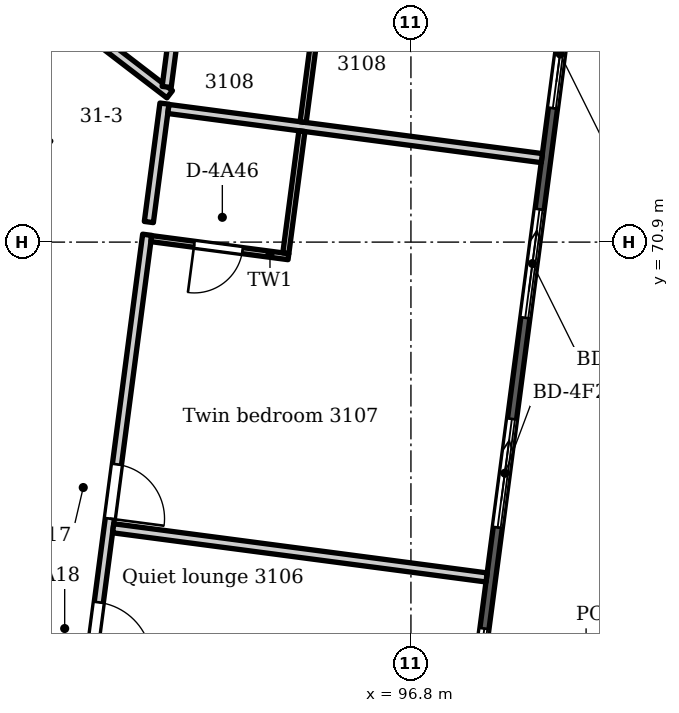
"""IFC4 building model, lengths in metres.
Left out: names, types, materials, properties, quantities, classifications, styles, units other than length and angle.
Written with IfcOpenShell. Run it as: python <this file> out.ifc"""

import sys

from ifc_helpers import new_model, si_unit, direction, frame, frame_2d, origin, place, context, subcontext, project, spatial, polyline, rectangle, outline, extrude, element, fill, save


model = new_model("IFC4")
c1 = context("Model", 3, precision=1e-05, world=origin(), true_north=direction((0.0, 1.0)))
c2 = subcontext(c1, "Body", "Model", "MODEL_VIEW")
j1 = project(units=[si_unit("LENGTHUNIT", "METRE"), si_unit("PLANEANGLEUNIT", "RADIAN")], contexts=[c1])
p1 = place(None, origin())
s1 = spatial("IfcSite", under=j1, at=p1, CompositionType="ELEMENT")
p2 = place(p1, origin())
s2 = spatial("IfcBuilding", under=s1, at=p2, CompositionType="ELEMENT")
p3 = place(p2, frame((0.0, 0.0, 124.2)))
s3 = spatial("IfcBuildingStorey", under=s2, at=p3, CompositionType="ELEMENT", Elevation=124.2)
p4 = place(p3, frame((52.387, 70.1, 0.0), z_axis=(0.0, 0.0, 1.0), x_axis=(0.92388051416, 0.382681062447, 0.0)))
e1 = element("IfcWall", 1, at=p4, inside=s3, PredefinedType="SOLIDWALL", context=c2, shape_type="SweptSolid", body=[
    extrude(outline(polyline([(0.149, 0.075), (0.149, -0.075), (45.057, -0.075), (45.057, 0.075), (0.149, 0.075)])), origin(), (0.0, 0.0, 1.0), 3.3),
])
p5 = place(p4, frame((1.239, 0.0, 0.0)))
e2 = element("IfcOpeningElement", 2, at=p5, cuts=e1, PredefinedType="OPENING", context=c2, shape_type="SweptSolid", body=[
    extrude(rectangle(XDim=1.8, YDim=2.6, at=frame_2d((0.9, 1.3))), frame((0.0, 0.085, 0.0), z_axis=(0.0, -1.0, 0.0), x_axis=(1.0, 0.0, 0.0)), (0.0, 0.0, 1.0), 0.17),
])
p6 = place(p4, frame((4.316, 0.0, 0.0)))
e3 = element("IfcOpeningElement", 3, at=p6, cuts=e1, PredefinedType="OPENING", context=c2, shape_type="SweptSolid", body=[
    extrude(rectangle(XDim=1.8, YDim=2.6, at=frame_2d((0.9, 1.3))), frame((0.0, 0.085, 0.0), z_axis=(0.0, -1.0, 0.0), x_axis=(1.0, 0.0, 0.0)), (0.0, 0.0, 1.0), 0.17),
])
p7 = place(p4, frame((7.793, 0.0, 0.0)))
e4 = element("IfcOpeningElement", 4, at=p7, cuts=e1, PredefinedType="OPENING", context=c2, shape_type="SweptSolid", body=[
    extrude(rectangle(XDim=1.8, YDim=2.6, at=frame_2d((0.9, 1.3))), frame((0.0, 0.085, 0.0), z_axis=(0.0, -1.0, 0.0), x_axis=(1.0, 0.0, 0.0)), (0.0, 0.0, 1.0), 0.17),
])
p8 = place(p4, frame((11.271, 0.0, 0.0)))
e5 = element("IfcOpeningElement", 5, at=p8, cuts=e1, PredefinedType="OPENING", context=c2, shape_type="SweptSolid", body=[
    extrude(rectangle(XDim=1.8, YDim=2.6, at=frame_2d((0.9, 1.3))), frame((0.0, 0.085, 0.0), z_axis=(0.0, -1.0, 0.0), x_axis=(1.0, 0.0, 0.0)), (0.0, 0.0, 1.0), 0.17),
])
p9 = place(p4, frame((14.748, 0.0, 0.0)))
e6 = element("IfcOpeningElement", 6, at=p9, cuts=e1, PredefinedType="OPENING", context=c2, shape_type="SweptSolid", body=[
    extrude(rectangle(XDim=1.8, YDim=2.6, at=frame_2d((0.9, 1.3))), frame((0.0, 0.085, 0.0), z_axis=(0.0, -1.0, 0.0), x_axis=(1.0, 0.0, 0.0)), (0.0, 0.0, 1.0), 0.17),
])
p10 = place(p4, frame((18.226, 0.0, 0.0)))
e7 = element("IfcOpeningElement", 7, at=p10, cuts=e1, PredefinedType="OPENING", context=c2, shape_type="SweptSolid", body=[
    extrude(rectangle(XDim=1.8, YDim=2.6, at=frame_2d((0.9, 1.3))), frame((0.0, 0.085, 0.0), z_axis=(0.0, -1.0, 0.0), x_axis=(1.0, 0.0, 0.0)), (0.0, 0.0, 1.0), 0.17),
])
p11 = place(p4, frame((21.703, 0.0, 0.0)))
e8 = element("IfcOpeningElement", 8, at=p11, cuts=e1, PredefinedType="OPENING", context=c2, shape_type="SweptSolid", body=[
    extrude(rectangle(XDim=1.8, YDim=2.6, at=frame_2d((0.9, 1.3))), frame((0.0, 0.085, 0.0), z_axis=(0.0, -1.0, 0.0), x_axis=(1.0, 0.0, 0.0)), (0.0, 0.0, 1.0), 0.17),
])
p12 = place(p4, frame((25.18, 0.0, 0.0)))
e9 = element("IfcOpeningElement", 9, at=p12, cuts=e1, PredefinedType="OPENING", context=c2, shape_type="SweptSolid", body=[
    extrude(rectangle(XDim=1.8, YDim=2.6, at=frame_2d((0.9, 1.3))), frame((0.0, 0.085, 0.0), z_axis=(0.0, -1.0, 0.0), x_axis=(1.0, 0.0, 0.0)), (0.0, 0.0, 1.0), 0.17),
])
p13 = place(p4, frame((28.658, 0.0, 0.0)))
e10 = element("IfcOpeningElement", 10, at=p13, cuts=e1, PredefinedType="OPENING", context=c2, shape_type="SweptSolid", body=[
    extrude(rectangle(XDim=1.8, YDim=2.6, at=frame_2d((0.9, 1.3))), frame((0.0, 0.085, 0.0), z_axis=(0.0, -1.0, 0.0), x_axis=(1.0, 0.0, 0.0)), (0.0, 0.0, 1.0), 0.17),
])
p14 = place(p4, frame((32.135, 0.0, 0.0)))
e11 = element("IfcOpeningElement", 11, at=p14, cuts=e1, PredefinedType="OPENING", context=c2, shape_type="SweptSolid", body=[
    extrude(rectangle(XDim=1.8, YDim=2.6, at=frame_2d((0.9, 1.3))), frame((0.0, 0.085, 0.0), z_axis=(0.0, -1.0, 0.0), x_axis=(1.0, 0.0, 0.0)), (0.0, 0.0, 1.0), 0.17),
])
p15 = place(p4, frame((35.613, 0.0, 0.0)))
e12 = element("IfcOpeningElement", 12, at=p15, cuts=e1, PredefinedType="OPENING", context=c2, shape_type="SweptSolid", body=[
    extrude(rectangle(XDim=1.8, YDim=2.6, at=frame_2d((0.9, 1.3))), frame((0.0, 0.085, 0.0), z_axis=(0.0, -1.0, 0.0), x_axis=(1.0, 0.0, 0.0)), (0.0, 0.0, 1.0), 0.17),
])
p16 = place(p4, frame((39.09, 0.0, 0.0)))
e13 = element("IfcOpeningElement", 13, at=p16, cuts=e1, PredefinedType="OPENING", context=c2, shape_type="SweptSolid", body=[
    extrude(rectangle(XDim=1.8, YDim=2.6, at=frame_2d((0.9, 1.3))), frame((0.0, 0.085, 0.0), z_axis=(0.0, -1.0, 0.0), x_axis=(1.0, 0.0, 0.0)), (0.0, 0.0, 1.0), 0.17),
])
p17 = place(p4, frame((42.167, 0.0, 0.0)))
e14 = element("IfcOpeningElement", 14, at=p17, cuts=e1, PredefinedType="OPENING", context=c2, shape_type="SweptSolid", body=[
    extrude(rectangle(XDim=1.8, YDim=2.6, at=frame_2d((0.9, 1.3))), frame((0.0, 0.085, 0.0), z_axis=(0.0, -1.0, 0.0), x_axis=(1.0, 0.0, 0.0)), (0.0, 0.0, 1.0), 0.17),
])
p18 = place(p3, frame((100.388, 82.614, 0.0), z_axis=(0.0, 0.0, 1.0), x_axis=(-0.130522128443, -0.991445396372, 0.0)))
e15 = element("IfcWall", 15, at=p18, inside=s3, PredefinedType="SOLIDWALL", context=c2, shape_type="SweptSolid", body=[
    extrude(outline(polyline([(0.149, 0.075), (0.149, -0.075), (45.057, -0.075), (45.057, 0.075), (0.149, 0.075)])), origin(), (0.0, 0.0, 1.0), 3.3),
])
p19 = place(p18, frame((1.239, 0.0, 0.0)))
e16 = element("IfcOpeningElement", 16, at=p19, cuts=e15, PredefinedType="OPENING", context=c2, shape_type="SweptSolid", body=[
    extrude(rectangle(XDim=1.8, YDim=2.6, at=frame_2d((0.9, 1.3))), frame((0.0, 0.085, 0.0), z_axis=(0.0, -1.0, 0.0), x_axis=(1.0, 0.0, 0.0)), (0.0, 0.0, 1.0), 0.17),
])
p20 = place(p18, frame((4.316, 0.0, 0.0)))
e17 = element("IfcOpeningElement", 17, at=p20, cuts=e15, PredefinedType="OPENING", context=c2, shape_type="SweptSolid", body=[
    extrude(rectangle(XDim=1.8, YDim=2.6, at=frame_2d((0.9, 1.3))), frame((0.0, 0.085, 0.0), z_axis=(0.0, -1.0, 0.0), x_axis=(1.0, 0.0, 0.0)), (0.0, 0.0, 1.0), 0.17),
])
p21 = place(p18, frame((7.793, 0.0, 0.0)))
e18 = element("IfcOpeningElement", 18, at=p21, cuts=e15, PredefinedType="OPENING", context=c2, shape_type="SweptSolid", body=[
    extrude(rectangle(XDim=1.8, YDim=2.6, at=frame_2d((0.9, 1.3))), frame((0.0, 0.085, 0.0), z_axis=(0.0, -1.0, 0.0), x_axis=(1.0, 0.0, 0.0)), (0.0, 0.0, 1.0), 0.17),
])
p22 = place(p18, frame((11.271, 0.0, 0.0)))
e19 = element("IfcOpeningElement", 19, at=p22, cuts=e15, PredefinedType="OPENING", context=c2, shape_type="SweptSolid", body=[
    extrude(rectangle(XDim=1.8, YDim=2.6, at=frame_2d((0.9, 1.3))), frame((0.0, 0.085, 0.0), z_axis=(0.0, -1.0, 0.0), x_axis=(1.0, 0.0, 0.0)), (0.0, 0.0, 1.0), 0.17),
])
p23 = place(p18, frame((14.748, 0.0, 0.0)))
e20 = element("IfcOpeningElement", 20, at=p23, cuts=e15, PredefinedType="OPENING", context=c2, shape_type="SweptSolid", body=[
    extrude(rectangle(XDim=1.8, YDim=2.6, at=frame_2d((0.9, 1.3))), frame((0.0, 0.085, 0.0), z_axis=(0.0, -1.0, 0.0), x_axis=(1.0, 0.0, 0.0)), (0.0, 0.0, 1.0), 0.17),
])
p24 = place(p18, frame((18.226, 0.0, 0.0)))
e21 = element("IfcOpeningElement", 21, at=p24, cuts=e15, PredefinedType="OPENING", context=c2, shape_type="SweptSolid", body=[
    extrude(rectangle(XDim=1.8, YDim=2.6, at=frame_2d((0.9, 1.3))), frame((0.0, 0.085, 0.0), z_axis=(0.0, -1.0, 0.0), x_axis=(1.0, 0.0, 0.0)), (0.0, 0.0, 1.0), 0.17),
])
p25 = place(p18, frame((21.703, 0.0, 0.0)))
e22 = element("IfcOpeningElement", 22, at=p25, cuts=e15, PredefinedType="OPENING", context=c2, shape_type="SweptSolid", body=[
    extrude(rectangle(XDim=1.8, YDim=2.6, at=frame_2d((0.9, 1.3))), frame((0.0, 0.085, 0.0), z_axis=(0.0, -1.0, 0.0), x_axis=(1.0, 0.0, 0.0)), (0.0, 0.0, 1.0), 0.17),
])
p26 = place(p18, frame((25.18, 0.0, 0.0)))
e23 = element("IfcOpeningElement", 23, at=p26, cuts=e15, PredefinedType="OPENING", context=c2, shape_type="SweptSolid", body=[
    extrude(rectangle(XDim=1.8, YDim=2.6, at=frame_2d((0.9, 1.3))), frame((0.0, 0.085, 0.0), z_axis=(0.0, -1.0, 0.0), x_axis=(1.0, 0.0, 0.0)), (0.0, 0.0, 1.0), 0.17),
])
p27 = place(p18, frame((28.658, 0.0, 0.0)))
e24 = element("IfcOpeningElement", 24, at=p27, cuts=e15, PredefinedType="OPENING", context=c2, shape_type="SweptSolid", body=[
    extrude(rectangle(XDim=1.8, YDim=2.6, at=frame_2d((0.9, 1.3))), frame((0.0, 0.085, 0.0), z_axis=(0.0, -1.0, 0.0), x_axis=(1.0, 0.0, 0.0)), (0.0, 0.0, 1.0), 0.17),
])
p28 = place(p18, frame((32.135, 0.0, 0.0)))
e25 = element("IfcOpeningElement", 25, at=p28, cuts=e15, PredefinedType="OPENING", context=c2, shape_type="SweptSolid", body=[
    extrude(rectangle(XDim=1.8, YDim=2.6, at=frame_2d((0.9, 1.3))), frame((0.0, 0.085, 0.0), z_axis=(0.0, -1.0, 0.0), x_axis=(1.0, 0.0, 0.0)), (0.0, 0.0, 1.0), 0.17),
])
p29 = place(p18, frame((35.613, 0.0, 0.0)))
e26 = element("IfcOpeningElement", 26, at=p29, cuts=e15, PredefinedType="OPENING", context=c2, shape_type="SweptSolid", body=[
    extrude(rectangle(XDim=1.8, YDim=2.6, at=frame_2d((0.9, 1.3))), frame((0.0, 0.085, 0.0), z_axis=(0.0, -1.0, 0.0), x_axis=(1.0, 0.0, 0.0)), (0.0, 0.0, 1.0), 0.17),
])
p30 = place(p18, frame((39.09, 0.0, 0.0)))
e27 = element("IfcOpeningElement", 27, at=p30, cuts=e15, PredefinedType="OPENING", context=c2, shape_type="SweptSolid", body=[
    extrude(rectangle(XDim=1.8, YDim=2.6, at=frame_2d((0.9, 1.3))), frame((0.0, 0.085, 0.0), z_axis=(0.0, -1.0, 0.0), x_axis=(1.0, 0.0, 0.0)), (0.0, 0.0, 1.0), 0.17),
])
p31 = place(p18, frame((42.167, 0.0, 0.0)))
e28 = element("IfcOpeningElement", 28, at=p31, cuts=e15, PredefinedType="OPENING", context=c2, shape_type="SweptSolid", body=[
    extrude(rectangle(XDim=1.8, YDim=2.6, at=frame_2d((0.9, 1.3))), frame((0.0, 0.085, 0.0), z_axis=(0.0, -1.0, 0.0), x_axis=(1.0, 0.0, 0.0)), (0.0, 0.0, 1.0), 0.17),
])
p32 = place(p3, origin())
e29 = element("IfcWall", 29, at=p32, inside=s3, PredefinedType="PARAPET", context=c2, shape_type="SweptSolid", body=[
    extrude(outline(polyline([(99.222, 55.637), (107.395, 84.139), (107.059, 84.055), (99.487, 57.649), (99.222, 55.637)])), origin(), (0.0, 0.0, 1.0), 1.1),
])
p33 = place(p3, frame((87.26, 77.607, 0.0), z_axis=(0.0, 0.0, 1.0), x_axis=(0.79336631803, -0.608744515718, 0.0)))
e30 = element("IfcWall", 30, at=p33, inside=s3, PredefinedType="PARTITIONING", context=c2, shape_type="SweptSolid", body=[
    extrude(rectangle(XDim=7.024, YDim=0.15, at=frame_2d((3.512, 0.0))), origin(), (0.0, 0.0, 1.0), 2.7),
])
p34 = place(p33, frame((1.086, 0.0, 0.0)))
e31 = element("IfcOpeningElement", 31, at=p34, cuts=e30, PredefinedType="OPENING", context=c2, shape_type="SweptSolid", body=[
    extrude(rectangle(XDim=1.8, YDim=2.1, at=frame_2d((0.9, 1.05))), frame((0.0, 0.085, 0.0), z_axis=(0.0, -1.0, 0.0), x_axis=(1.0, 0.0, 0.0)), (0.0, 0.0, 1.0), 0.17),
])
p35 = place(p3, frame((91.374, 62.752, 0.0), z_axis=(0.0, 0.0, 1.0), x_axis=(0.130502976736, 0.991447917474, 0.0)))
e32 = element("IfcWall", 32, at=p35, inside=s3, PredefinedType="PARTITIONING", context=c2, shape_type="SweptSolid", body=[
    extrude(rectangle(XDim=8.34, YDim=0.15, at=frame_2d((4.17, 0.0))), origin(), (0.0, 0.0, 1.0), 3.3),
])
p36 = place(p35, frame((3.632, 0.0, 0.0)))
e33 = element("IfcOpeningElement", 33, at=p36, cuts=e32, PredefinedType="OPENING", context=c2, shape_type="SweptSolid", body=[
    extrude(rectangle(XDim=0.9, YDim=2.1, at=frame_2d((0.45, 1.05))), frame((0.0, 0.085, 0.0), z_axis=(0.0, -1.0, 0.0), x_axis=(1.0, 0.0, 0.0)), (0.0, 0.0, 1.0), 0.17),
])
p37 = place(p35, frame((1.243, 0.0, 0.0)))
e34 = element("IfcOpeningElement", 34, at=p37, cuts=e32, PredefinedType="OPENING", context=c2, shape_type="SweptSolid", body=[
    extrude(rectangle(XDim=1.0, YDim=2.1, at=frame_2d((0.5, 1.05))), frame((0.0, 0.085, 0.0), z_axis=(0.0, -1.0, 0.0), x_axis=(1.0, 0.0, 0.0)), (0.0, 0.0, 1.0), 0.17),
])
p38 = place(p3, frame((91.903, 66.194, 0.0), z_axis=(0.0, 0.0, 1.0), x_axis=(0.991436980159, -0.130586042033, 0.0)))
e35 = element("IfcWall", 35, at=p38, inside=s3, PredefinedType="PARTITIONING", context=c2, shape_type="SweptSolid", body=[
    extrude(rectangle(XDim=6.194, YDim=0.15, at=frame_2d((3.097, 0.0))), origin(), (0.0, 0.0, 1.0), 3.3),
])
p39 = place(p3, frame((92.531, 70.957, 0.0), z_axis=(0.0, 0.0, 1.0), x_axis=(0.991445890878, -0.130518372124, 0.0)))
e36 = element("IfcWall", 36, at=p39, inside=s3, PredefinedType="PARTITIONING", context=c2, shape_type="SweptSolid", body=[
    extrude(rectangle(XDim=2.275, YDim=0.1, at=frame_2d((1.137, 0.0))), origin(), (0.0, 0.0, 1.0), 3.3),
])
p40 = place(p39, frame((0.712, 0.0, 0.0)))
e37 = element("IfcOpeningElement", 37, at=p40, cuts=e36, PredefinedType="OPENING", context=c2, shape_type="SweptSolid", body=[
    extrude(rectangle(XDim=0.8, YDim=2.1, at=frame_2d((0.4, 1.05))), frame((0.0, 0.06, 0.0), z_axis=(0.0, -1.0, 0.0), x_axis=(1.0, 0.0, 0.0)), (0.0, 0.0, 1.0), 0.12),
])
p41 = place(p3, frame((92.49, 71.23, 0.0), z_axis=(0.0, 0.0, 1.0), x_axis=(0.130747069904, 0.991415757244, 0.0)))
e38 = element("IfcWall", 38, at=p41, inside=s3, PredefinedType="PARTITIONING", context=c2, shape_type="SweptSolid", body=[
    extrude(rectangle(XDim=1.964, YDim=0.15, at=frame_2d((0.982, 0.0))), origin(), (0.0, 0.0, 1.0), 3.3),
])
p42 = place(p3, frame((92.811, 73.089, 0.0), z_axis=(0.0, 0.0, 1.0), x_axis=(0.991458051546, -0.130425963766, 0.0)))
e39 = element("IfcWall", 39, at=p42, inside=s3, PredefinedType="PARTITIONING", context=c2, shape_type="SweptSolid", body=[
    extrude(rectangle(XDim=6.194, YDim=0.15, at=frame_2d((3.097, 0.0))), origin(), (0.0, 0.0, 1.0), 3.3),
])
p43 = place(p3, frame((92.783, 73.451, 0.0), z_axis=(0.0, 0.0, 1.0), x_axis=(0.130312245432, 0.991473004519, 0.0)))
e40 = element("IfcWall", 40, at=p43, inside=s3, PredefinedType="PARTITIONING", context=c2, shape_type="SweptSolid", body=[
    extrude(rectangle(XDim=1.598, YDim=0.15, at=frame_2d((0.799, 0.0))), origin(), (0.0, 0.0, 1.0), 3.3),
])
p44 = place(p3, frame((94.742, 70.717, 0.0), z_axis=(0.0, 0.0, 1.0), x_axis=(0.130663420693, 0.991426785241, 0.0)))
e41 = element("IfcWall", 41, at=p44, inside=s3, PredefinedType="PARTITIONING", context=c2, shape_type="SweptSolid", body=[
    extrude(rectangle(XDim=2.025, YDim=0.1, at=frame_2d((1.013, 0.0))), origin(), (0.0, 0.0, 1.0), 3.3),
])
p45 = place(p3, frame((95.027, 72.873, 0.0), z_axis=(0.0, 0.0, 1.0), x_axis=(0.130191453907, 0.991488873024, 0.0)))
e42 = element("IfcWall", 42, at=p45, inside=s3, PredefinedType="PARTITIONING", context=c2, shape_type="SweptSolid", body=[
    extrude(rectangle(XDim=1.825, YDim=0.1, at=frame_2d((0.912, 0.0))), origin(), (0.0, 0.0, 1.0), 3.3),
])
p46 = place(p21, origin())
e43 = element("IfcDoor", 43, at=p46, inside=s3, OperationType="SLIDING_TO_LEFT", PredefinedType="DOOR", context=c2, shape_type="SweptSolid", body=[
    extrude(rectangle(XDim=1.8, YDim=2.6, at=frame_2d((0.9, 1.3))), frame((0.0, 0.025, 0.0), z_axis=(0.0, -1.0, 0.0), x_axis=(1.0, 0.0, 0.0)), (0.0, 0.0, 1.0), 0.05),
])
fill(e18, e43)
p47 = place(p22, origin())
e44 = element("IfcDoor", 44, at=p47, inside=s3, OperationType="SLIDING_TO_LEFT", PredefinedType="DOOR", context=c2, shape_type="SweptSolid", body=[
    extrude(rectangle(XDim=1.8, YDim=2.6, at=frame_2d((0.9, 1.3))), frame((0.0, 0.025, 0.0), z_axis=(0.0, -1.0, 0.0), x_axis=(1.0, 0.0, 0.0)), (0.0, 0.0, 1.0), 0.05),
])
fill(e19, e44)
p48 = place(p23, origin())
e45 = element("IfcDoor", 45, at=p48, inside=s3, OperationType="SLIDING_TO_LEFT", PredefinedType="DOOR", context=c2, shape_type="SweptSolid", body=[
    extrude(rectangle(XDim=1.8, YDim=2.6, at=frame_2d((0.9, 1.3))), frame((0.0, 0.025, 0.0), z_axis=(0.0, -1.0, 0.0), x_axis=(1.0, 0.0, 0.0)), (0.0, 0.0, 1.0), 0.05),
])
fill(e20, e45)
p49 = place(p24, origin())
e46 = element("IfcDoor", 46, at=p49, inside=s3, OperationType="SLIDING_TO_LEFT", PredefinedType="DOOR", context=c2, shape_type="SweptSolid", body=[
    extrude(rectangle(XDim=1.8, YDim=2.6, at=frame_2d((0.9, 1.3))), frame((0.0, 0.025, 0.0), z_axis=(0.0, -1.0, 0.0), x_axis=(1.0, 0.0, 0.0)), (0.0, 0.0, 1.0), 0.05),
])
fill(e21, e46)
p50 = place(p36, frame((0.9, 0.0, 0.0), z_axis=(0.0, 0.0, 1.0), x_axis=(-1.0, 0.0, 0.0)))
e47 = element("IfcDoor", 47, at=p50, inside=s3, OperationType="SINGLE_SWING_RIGHT", PredefinedType="DOOR", context=c2, shape_type="SweptSolid", body=[
    extrude(rectangle(XDim=0.9, YDim=2.1, at=frame_2d((0.45, 1.05))), frame((0.0, 0.025, 0.0), z_axis=(0.0, -1.0, 0.0), x_axis=(1.0, 0.0, 0.0)), (0.0, 0.0, 1.0), 0.05),
])
fill(e33, e47)
p51 = place(p37, frame((1.0, 0.0, 0.0), z_axis=(0.0, 0.0, 1.0), x_axis=(-1.0, 0.0, 0.0)))
e48 = element("IfcDoor", 48, at=p51, inside=s3, OperationType="SINGLE_SWING_RIGHT", PredefinedType="DOOR", context=c2, shape_type="SweptSolid", body=[
    extrude(rectangle(XDim=1.0, YDim=2.1, at=frame_2d((0.5, 1.05))), frame((0.0, 0.025, 0.0), z_axis=(0.0, -1.0, 0.0), x_axis=(1.0, 0.0, 0.0)), (0.0, 0.0, 1.0), 0.05),
])
fill(e34, e48)
p52 = place(p40, frame((0.8, 0.0, 0.0), z_axis=(0.0, 0.0, 1.0), x_axis=(-1.0, 0.0, 0.0)))
e49 = element("IfcDoor", 49, at=p52, inside=s3, OperationType="SINGLE_SWING_RIGHT", PredefinedType="DOOR", context=c2, shape_type="SweptSolid", body=[
    extrude(rectangle(XDim=0.8, YDim=2.1, at=frame_2d((0.4, 1.05))), frame((0.0, 0.025, 0.0), z_axis=(0.0, -1.0, 0.0), x_axis=(1.0, 0.0, 0.0)), (0.0, 0.0, 1.0), 0.05),
])
fill(e37, e49)
save(model, sys.argv[1])
